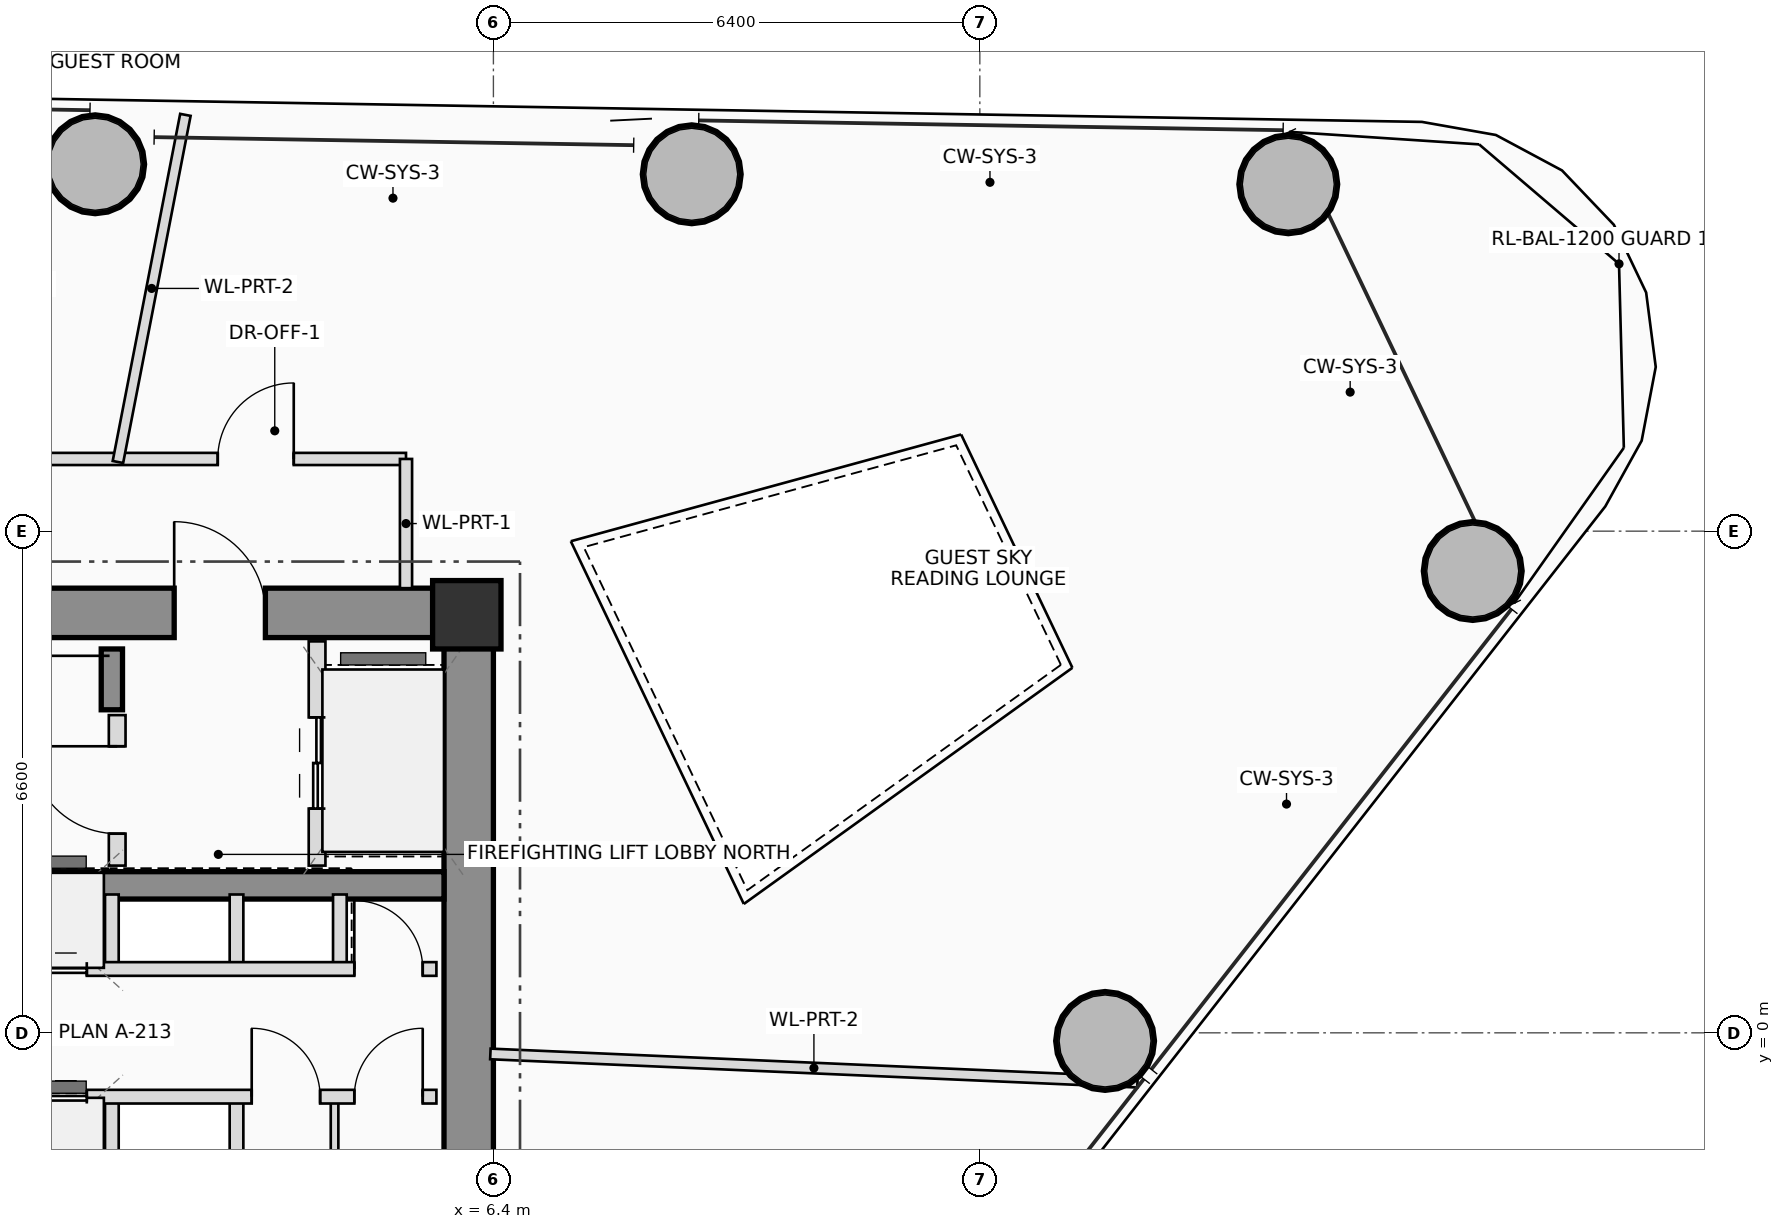
"""IFC4 building model, lengths in metres.
Left out: names, types, materials, properties, quantities, classifications, styles, units other than length and angle.
Written with IfcOpenShell. Run it as: python <this file> out.ifc"""

import sys

from ifc_helpers import new_model, si_unit, direction, frame, frame_2d, origin, origin_2d, place, context, subcontext, project, spatial, rectangle, hollow_circle, extrude, source, transform, mapped, element, fill, save


model = new_model("IFC4")
c1 = context("Model", 3, precision=1e-05, world=origin(), true_north=direction((0.0, 1.0)))
c2 = subcontext(c1, "Body", "Model", "MODEL_VIEW")
j1 = project(units=[si_unit("LENGTHUNIT", "METRE"), si_unit("PLANEANGLEUNIT", "RADIAN")], contexts=[c1])
p1 = place(None, origin())
s1 = spatial("IfcSite", under=j1, at=p1, CompositionType="ELEMENT")
p2 = place(p1, origin())
s2 = spatial("IfcBuilding", under=s1, at=p2, CompositionType="ELEMENT")
p3 = place(p2, frame((0.0, 0.0, 129.5)))
s3 = spatial("IfcBuildingStorey", under=s2, at=p3, CompositionType="ELEMENT", Elevation=129.5)
m1 = source(origin(), c2, "Body", "SweptSolid", [
    extrude(rectangle(XDim=0.9, YDim=0.9, at=origin_2d()), origin(), (0.0, 0.0, 1.0), 3.45),
])
p4 = place(p3, frame((6.05, 5.5, 0.0), z_axis=(0.0, 0.0, 1.0), x_axis=(1.0, 0.0, 0.0)))
e1 = element("IfcColumn", 1, at=p4, inside=s3, PredefinedType="COLUMN", context=c2, shape_type="MappedRepresentation", body=[
    mapped(m1, transform((0.0, 0.0, 0.0), scale=1.0)),
])
p5 = place(p3, frame((-6.4, 5.525, 0.0), z_axis=(0.0, 0.0, 1.0), x_axis=(1.0, 0.0, 0.0)))
e2 = element("IfcWall", 2, at=p5, inside=s3, PredefinedType="SHEAR", context=c2, shape_type="SweptSolid", body=[
    extrude(rectangle(XDim=12.8, YDim=0.65, at=frame_2d((6.4, 0.0))), origin(), (0.0, 0.0, 1.0), 3.45),
])
p6 = place(p5, frame((8.6, 0.0, 0.0)))
e3 = element("IfcOpeningElement", 3, at=p6, cuts=e2, PredefinedType="OPENING", context=c2, shape_type="SweptSolid", body=[
    extrude(rectangle(XDim=1.2, YDim=2.2, at=frame_2d((0.6, 1.1))), frame((0.0, 0.335, 0.0), z_axis=(0.0, -1.0, 0.0), x_axis=(1.0, 0.0, 0.0)), (0.0, 0.0, 1.0), 0.67),
])
p7 = place(p3, frame((6.075, -5.2, 0.0), z_axis=(0.0, 0.0, 1.0), x_axis=(0.0, 1.0, 0.0)))
e4 = element("IfcWall", 4, at=p7, inside=s3, PredefinedType="SHEAR", context=c2, shape_type="SweptSolid", body=[
    extrude(rectangle(XDim=10.4, YDim=0.65, at=frame_2d((5.2, 0.0))), origin(), (0.0, 0.0, 1.0), 3.45),
])
p8 = place(p3, frame((-5.75, 1.94, 0.0), z_axis=(0.0, 0.0, 1.0), x_axis=(1.0, 0.0, 0.0)))
e5 = element("IfcWall", 5, at=p8, inside=s3, PredefinedType="SHEAR", context=c2, shape_type="SweptSolid", body=[
    extrude(rectangle(XDim=11.5, YDim=0.36, at=frame_2d((5.75, 0.0))), origin(), (0.0, 0.0, 1.0), 3.45),
])
p9 = place(p3, frame((1.38, 4.25, 0.0), z_axis=(0.0, 0.0, 1.0), x_axis=(0.0, 1.0, 0.0)))
e6 = element("IfcWall", 6, at=p9, inside=s3, PredefinedType="SHEAR", context=c2, shape_type="SweptSolid", body=[
    extrude(rectangle(XDim=0.8, YDim=0.28, at=frame_2d((0.4, 0.0))), origin(), (0.0, 0.0, 1.0), 3.45),
])
m2 = source(origin(), c2, "Body", "SweptSolid", [
    extrude(hollow_circle(Radius=0.65, WallThickness=0.045, at=origin_2d()), origin(), (0.0, 0.0, 1.0), 3.45),
])
for number, where, z_axis, x_axis in (
    (7, (14.448, -0.107, 0.0), (0.0, 0.0, 1.0), (1.0, 0.0, 0.0)),
    (8, (19.285, 6.076, 0.0), (0.0, 0.0, 1.0), (1.0, 0.0, 0.0)),
    (9, (16.858, 11.164, 0.0), (0.0, 0.0, 1.0), (1.0, 0.0, 0.0)),
    (10, (9.01, 11.295, 0.0), (0.0, 0.0, 1.0), (1.0, 0.0, 0.0)),
    (11, (1.16, 11.427, 0.0), (0.0, 0.0, 1.0), (1.0, 0.0, 0.0)),
):
    element("IfcColumn", number, at=place(p3, frame(where, z_axis=z_axis, x_axis=x_axis)), inside=s3, PredefinedType="COLUMN", context=c2, shape_type="MappedRepresentation", body=[
        mapped(m2, transform((0.0, 0.0, 0.0), scale=1.0)),
    ])
p10 = place(p3, frame((1.45, 2.2, 0.0), z_axis=(0.0, 0.0, 1.0), x_axis=(0.0, 1.0, 0.0)))
e12 = element("IfcWall", 12, at=p10, inside=s3, PredefinedType="PLUMBINGWALL", context=c2, shape_type="SweptSolid", body=[
    extrude(rectangle(XDim=1.98, YDim=0.22, at=frame_2d((0.99, 0.0))), origin(), (0.0, 0.0, 1.0), 3.25),
])
p11 = place(p10, frame((0.42, 0.0, 0.0)))
e13 = element("IfcOpeningElement", 13, at=p11, cuts=e12, PredefinedType="OPENING", context=c2, shape_type="SweptSolid", body=[
    extrude(rectangle(XDim=1.15, YDim=2.15, at=frame_2d((0.575, 1.075))), frame((0.0, 0.12, 0.0), z_axis=(0.0, -1.0, 0.0), x_axis=(1.0, 0.0, 0.0)), (0.0, 0.0, 1.0), 0.24),
])
p12 = place(p3, frame((4.08, 2.2, 0.0), z_axis=(0.0, 0.0, 1.0), x_axis=(0.0, 1.0, 0.0)))
e14 = element("IfcWall", 14, at=p12, inside=s3, PredefinedType="PLUMBINGWALL", context=c2, shape_type="SweptSolid", body=[
    extrude(rectangle(XDim=2.95, YDim=0.22, at=frame_2d((1.475, 0.0))), origin(), (0.0, 0.0, 1.0), 3.25),
])
p13 = place(p12, frame((0.75, 0.0, 0.0)))
e15 = element("IfcOpeningElement", 15, at=p13, cuts=e14, PredefinedType="OPENING", context=c2, shape_type="SweptSolid", body=[
    extrude(rectangle(XDim=1.2, YDim=2.25, at=frame_2d((0.6, 1.125))), frame((0.0, 0.12, 0.0), z_axis=(0.0, -1.0, 0.0), x_axis=(1.0, 0.0, 0.0)), (0.0, 0.0, 1.0), 0.24),
])
for number, where, z_axis, x_axis in (
    (16, (1.38, 0.84, 0.0), (0.0, 0.0, 1.0), (0.0, 1.0, 0.0)),
    (17, (1.38, -1.82, 0.0), (0.0, 0.0, 1.0), (0.0, 1.0, 0.0)),
    (18, (3.02, 0.84, 0.0), (0.0, 0.0, 1.0), (0.0, 1.0, 0.0)),
    (19, (4.38, 0.84, 0.0), (0.0, 0.0, 1.0), (0.0, 1.0, 0.0)),
    (20, (3.02, -1.82, 0.0), (0.0, 0.0, 1.0), (0.0, 1.0, 0.0)),
):
    element("IfcWall", number, at=place(p3, frame(where, z_axis=z_axis, x_axis=x_axis)), inside=s3, PredefinedType="PLUMBINGWALL", context=c2, shape_type="SweptSolid", body=[
        extrude(rectangle(XDim=0.98, YDim=0.18, at=frame_2d((0.49, 0.0))), origin(), (0.0, 0.0, 1.0), 3.25),
    ])
p14 = place(p3, frame((4.31, -1.82, 0.0), z_axis=(0.0, 0.0, 1.0), x_axis=(0.0, 1.0, 0.0)))
e21 = element("IfcWall", 21, at=p14, inside=s3, PredefinedType="PARTITIONING", context=c2, shape_type="SweptSolid", body=[
    extrude(rectangle(XDim=0.98, YDim=0.1, at=frame_2d((0.49, 0.0))), origin(), (0.0, 0.0, 1.0), 3.25),
])
p15 = place(p3, frame((-5.68, 0.84, 0.0), z_axis=(0.0, 0.0, 1.0), x_axis=(1.0, 0.0, 0.0)))
e22 = element("IfcWall", 22, at=p15, inside=s3, PredefinedType="PLUMBINGWALL", context=c2, shape_type="SweptSolid", body=[
    extrude(rectangle(XDim=11.33, YDim=0.18, at=frame_2d((5.665, 0.0))), origin(), (0.0, 0.0, 1.0), 3.25),
])
p16 = place(p15, frame((1.58, 0.0, 0.0)))
e23 = element("IfcOpeningElement", 23, at=p16, cuts=e22, PredefinedType="OPENING", context=c2, shape_type="SweptSolid", body=[
    extrude(rectangle(XDim=0.92, YDim=2.1, at=frame_2d((0.46, 1.05))), frame((0.0, 0.1, 0.0), z_axis=(0.0, -1.0, 0.0), x_axis=(1.0, 0.0, 0.0)), (0.0, 0.0, 1.0), 0.2),
])
p17 = place(p15, frame((3.93, 0.0, 0.0)))
e24 = element("IfcOpeningElement", 24, at=p17, cuts=e22, PredefinedType="OPENING", context=c2, shape_type="SweptSolid", body=[
    extrude(rectangle(XDim=1.1, YDim=2.2, at=frame_2d((0.55, 1.1))), frame((0.0, 0.1, 0.0), z_axis=(0.0, -1.0, 0.0), x_axis=(1.0, 0.0, 0.0)), (0.0, 0.0, 1.0), 0.2),
])
p18 = place(p15, frame((5.63, 0.0, 0.0)))
e25 = element("IfcOpeningElement", 25, at=p18, cuts=e22, PredefinedType="OPENING", context=c2, shape_type="SweptSolid", body=[
    extrude(rectangle(XDim=1.1, YDim=2.2, at=frame_2d((0.55, 1.1))), frame((0.0, 0.1, 0.0), z_axis=(0.0, -1.0, 0.0), x_axis=(1.0, 0.0, 0.0)), (0.0, 0.0, 1.0), 0.2),
])
p19 = place(p15, frame((10.25, 0.0, 0.0)))
e26 = element("IfcOpeningElement", 26, at=p19, cuts=e22, PredefinedType="OPENING", context=c2, shape_type="SweptSolid", body=[
    extrude(rectangle(XDim=0.9, YDim=2.05, at=frame_2d((0.45, 1.025))), frame((0.0, 0.1, 0.0), z_axis=(0.0, -1.0, 0.0), x_axis=(1.0, 0.0, 0.0)), (0.0, 0.0, 1.0), 0.2),
])
p20 = place(p3, frame((-5.68, -0.84, 0.0), z_axis=(0.0, 0.0, 1.0), x_axis=(1.0, 0.0, 0.0)))
e27 = element("IfcWall", 27, at=p20, inside=s3, PredefinedType="PLUMBINGWALL", context=c2, shape_type="SweptSolid", body=[
    extrude(rectangle(XDim=11.33, YDim=0.18, at=frame_2d((5.665, 0.0))), origin(), (0.0, 0.0, 1.0), 3.25),
])
p21 = place(p20, frame((1.18, 0.0, 0.0)))
e28 = element("IfcOpeningElement", 28, at=p21, cuts=e27, PredefinedType="OPENING", context=c2, shape_type="SweptSolid", body=[
    extrude(rectangle(XDim=0.9, YDim=2.05, at=frame_2d((0.45, 1.025))), frame((0.0, 0.1, 0.0), z_axis=(0.0, -1.0, 0.0), x_axis=(1.0, 0.0, 0.0)), (0.0, 0.0, 1.0), 0.2),
])
p22 = place(p20, frame((3.93, 0.0, 0.0)))
e29 = element("IfcOpeningElement", 29, at=p22, cuts=e27, PredefinedType="OPENING", context=c2, shape_type="SweptSolid", body=[
    extrude(rectangle(XDim=1.1, YDim=2.2, at=frame_2d((0.55, 1.1))), frame((0.0, 0.1, 0.0), z_axis=(0.0, -1.0, 0.0), x_axis=(1.0, 0.0, 0.0)), (0.0, 0.0, 1.0), 0.2),
])
p23 = place(p20, frame((5.63, 0.0, 0.0)))
e30 = element("IfcOpeningElement", 30, at=p23, cuts=e27, PredefinedType="OPENING", context=c2, shape_type="SweptSolid", body=[
    extrude(rectangle(XDim=1.1, YDim=2.2, at=frame_2d((0.55, 1.1))), frame((0.0, 0.1, 0.0), z_axis=(0.0, -1.0, 0.0), x_axis=(1.0, 0.0, 0.0)), (0.0, 0.0, 1.0), 0.2),
])
p24 = place(p20, frame((8.9, 0.0, 0.0)))
e31 = element("IfcOpeningElement", 31, at=p24, cuts=e27, PredefinedType="OPENING", context=c2, shape_type="SweptSolid", body=[
    extrude(rectangle(XDim=0.9, YDim=2.05, at=frame_2d((0.45, 1.025))), frame((0.0, 0.1, 0.0), z_axis=(0.0, -1.0, 0.0), x_axis=(1.0, 0.0, 0.0)), (0.0, 0.0, 1.0), 0.2),
])
p25 = place(p20, frame((10.25, 0.0, 0.0)))
e32 = element("IfcOpeningElement", 32, at=p25, cuts=e27, PredefinedType="OPENING", context=c2, shape_type="SweptSolid", body=[
    extrude(rectangle(XDim=0.9, YDim=2.05, at=frame_2d((0.45, 1.025))), frame((0.0, 0.1, 0.0), z_axis=(0.0, -1.0, 0.0), x_axis=(1.0, 0.0, 0.0)), (0.0, 0.0, 1.0), 0.2),
])
p26 = place(p3, frame((-6.36, 7.55, 0.0), z_axis=(0.0, 0.0, 1.0), x_axis=(1.0, 0.0, 0.0)))
e33 = element("IfcWall", 33, at=p26, inside=s3, PredefinedType="PARTITIONING", context=c2, shape_type="SweptSolid", body=[
    extrude(rectangle(XDim=11.61, YDim=0.16, at=frame_2d((5.805, 0.0))), origin(), (0.0, 0.0, 1.0), 2.605),
])
p27 = place(p26, frame((4.33, 0.0, 0.0)))
e34 = element("IfcOpeningElement", 34, at=p27, cuts=e33, PredefinedType="OPENING", context=c2, shape_type="SweptSolid", body=[
    extrude(rectangle(XDim=1.05, YDim=2.2, at=frame_2d((0.525, 1.1))), frame((0.0, 0.09, 0.0), z_axis=(0.0, -1.0, 0.0), x_axis=(1.0, 0.0, 0.0)), (0.0, 0.0, 1.0), 0.18),
])
p28 = place(p26, frame((9.133, 0.0, 0.0)))
e35 = element("IfcOpeningElement", 35, at=p28, cuts=e33, PredefinedType="OPENING", context=c2, shape_type="SweptSolid", body=[
    extrude(rectangle(XDim=1.0, YDim=2.25, at=frame_2d((0.5, 1.125))), frame((0.0, 0.09, 0.0), z_axis=(0.0, -1.0, 0.0), x_axis=(1.0, 0.0, 0.0)), (0.0, 0.0, 1.0), 0.18),
])
p29 = place(p3, frame((5.25, 7.55, 0.0), z_axis=(0.0, 0.0, 1.0), x_axis=(0.0, -1.0, 0.0)))
e36 = element("IfcWall", 36, at=p29, inside=s3, PredefinedType="PARTITIONING", context=c2, shape_type="SweptSolid", body=[
    extrude(rectangle(XDim=1.7, YDim=0.16, at=frame_2d((0.85, 0.0))), origin(), (0.0, 0.0, 1.0), 2.605),
])
p30 = place(p3, frame((6.36, -0.278, 0.0), z_axis=(0.0, 0.0, 1.0), x_axis=(0.999047707238, -0.043631166178, 0.0)))
e37 = element("IfcWall", 37, at=p30, inside=s3, PredefinedType="PARTITIONING", context=c2, shape_type="SweptSolid", body=[
    extrude(rectangle(XDim=8.522, YDim=0.14, at=frame_2d((4.261, 0.0))), origin(), (0.0, 0.0, 1.0), 2.605),
])
p31 = place(p3, frame((1.46, 7.51, 0.0), z_axis=(0.0, 0.0, 1.0), x_axis=(0.19080504805, 0.981627950722, 0.0)))
e38 = element("IfcWall", 38, at=p31, inside=s3, PredefinedType="PARTITIONING", context=c2, shape_type="SweptSolid", body=[
    extrude(rectangle(XDim=4.652, YDim=0.14, at=frame_2d((2.326, 0.0))), origin(), (0.0, 0.0, 1.0), 2.605),
])
p32 = place(p6, origin())
e39 = element("IfcDoor", 39, at=p32, inside=s3, OperationType="SINGLE_SWING_LEFT", PredefinedType="DOOR", context=c2, shape_type="SweptSolid", body=[
    extrude(rectangle(XDim=1.2, YDim=2.2, at=frame_2d((0.6, 1.1))), frame((0.0, 0.025, 0.0), z_axis=(0.0, -1.0, 0.0), x_axis=(1.0, 0.0, 0.0)), (0.0, 0.0, 1.0), 0.05),
])
fill(e3, e39)
p33 = place(p11, origin())
e40 = element("IfcDoor", 40, at=p33, inside=s3, OperationType="SINGLE_SWING_RIGHT", PredefinedType="DOOR", context=c2, shape_type="SweptSolid", body=[
    extrude(rectangle(XDim=1.15, YDim=2.15, at=frame_2d((0.575, 1.075))), frame((0.0, 0.025, 0.0), z_axis=(0.0, -1.0, 0.0), x_axis=(1.0, 0.0, 0.0)), (0.0, 0.0, 1.0), 0.05),
])
fill(e13, e40)
p34 = place(p13, origin())
e41 = element("IfcDoor", 41, at=p34, inside=s3, OperationType="DOUBLE_DOOR_SLIDING", PredefinedType="DOOR", context=c2, shape_type="SweptSolid", body=[
    extrude(rectangle(XDim=1.2, YDim=2.25, at=frame_2d((0.6, 1.125))), frame((0.0, 0.025, 0.0), z_axis=(0.0, -1.0, 0.0), x_axis=(1.0, 0.0, 0.0)), (0.0, 0.0, 1.0), 0.05),
])
fill(e15, e41)
p35 = place(p18, origin())
e42 = element("IfcDoor", 42, at=p35, inside=s3, OperationType="DOUBLE_DOOR_SLIDING", PredefinedType="DOOR", context=c2, shape_type="SweptSolid", body=[
    extrude(rectangle(XDim=1.1, YDim=2.2, at=frame_2d((0.55, 1.1))), frame((0.0, 0.025, 0.0), z_axis=(0.0, -1.0, 0.0), x_axis=(1.0, 0.0, 0.0)), (0.0, 0.0, 1.0), 0.05),
])
fill(e25, e42)
p36 = place(p19, origin())
e43 = element("IfcDoor", 43, at=p36, inside=s3, OperationType="SINGLE_SWING_LEFT", PredefinedType="DOOR", context=c2, shape_type="SweptSolid", body=[
    extrude(rectangle(XDim=0.9, YDim=2.05, at=frame_2d((0.45, 1.025))), frame((0.0, 0.025, 0.0), z_axis=(0.0, -1.0, 0.0), x_axis=(1.0, 0.0, 0.0)), (0.0, 0.0, 1.0), 0.05),
])
fill(e26, e43)
p37 = place(p23, origin())
e44 = element("IfcDoor", 44, at=p37, inside=s3, OperationType="DOUBLE_DOOR_SLIDING", PredefinedType="DOOR", context=c2, shape_type="SweptSolid", body=[
    extrude(rectangle(XDim=1.1, YDim=2.2, at=frame_2d((0.55, 1.1))), frame((0.0, 0.025, 0.0), z_axis=(0.0, -1.0, 0.0), x_axis=(1.0, 0.0, 0.0)), (0.0, 0.0, 1.0), 0.05),
])
fill(e30, e44)
p38 = place(p24, origin())
e45 = element("IfcDoor", 45, at=p38, inside=s3, OperationType="SINGLE_SWING_LEFT", PredefinedType="DOOR", context=c2, shape_type="SweptSolid", body=[
    extrude(rectangle(XDim=0.9, YDim=2.05, at=frame_2d((0.45, 1.025))), frame((0.0, 0.025, 0.0), z_axis=(0.0, -1.0, 0.0), x_axis=(1.0, 0.0, 0.0)), (0.0, 0.0, 1.0), 0.05),
])
fill(e31, e45)
p39 = place(p25, origin())
e46 = element("IfcDoor", 46, at=p39, inside=s3, OperationType="SINGLE_SWING_RIGHT", PredefinedType="DOOR", context=c2, shape_type="SweptSolid", body=[
    extrude(rectangle(XDim=0.9, YDim=2.05, at=frame_2d((0.45, 1.025))), frame((0.0, 0.025, 0.0), z_axis=(0.0, -1.0, 0.0), x_axis=(1.0, 0.0, 0.0)), (0.0, 0.0, 1.0), 0.05),
])
fill(e32, e46)
p40 = place(p28, origin())
e47 = element("IfcDoor", 47, at=p40, inside=s3, OperationType="SINGLE_SWING_RIGHT", PredefinedType="DOOR", context=c2, shape_type="SweptSolid", body=[
    extrude(rectangle(XDim=1.0, YDim=2.25, at=frame_2d((0.5, 1.125))), frame((0.0, 0.025, 0.0), z_axis=(0.0, -1.0, 0.0), x_axis=(1.0, 0.0, 0.0)), (0.0, 0.0, 1.0), 0.05),
])
fill(e35, e47)
save(model, sys.argv[1])
